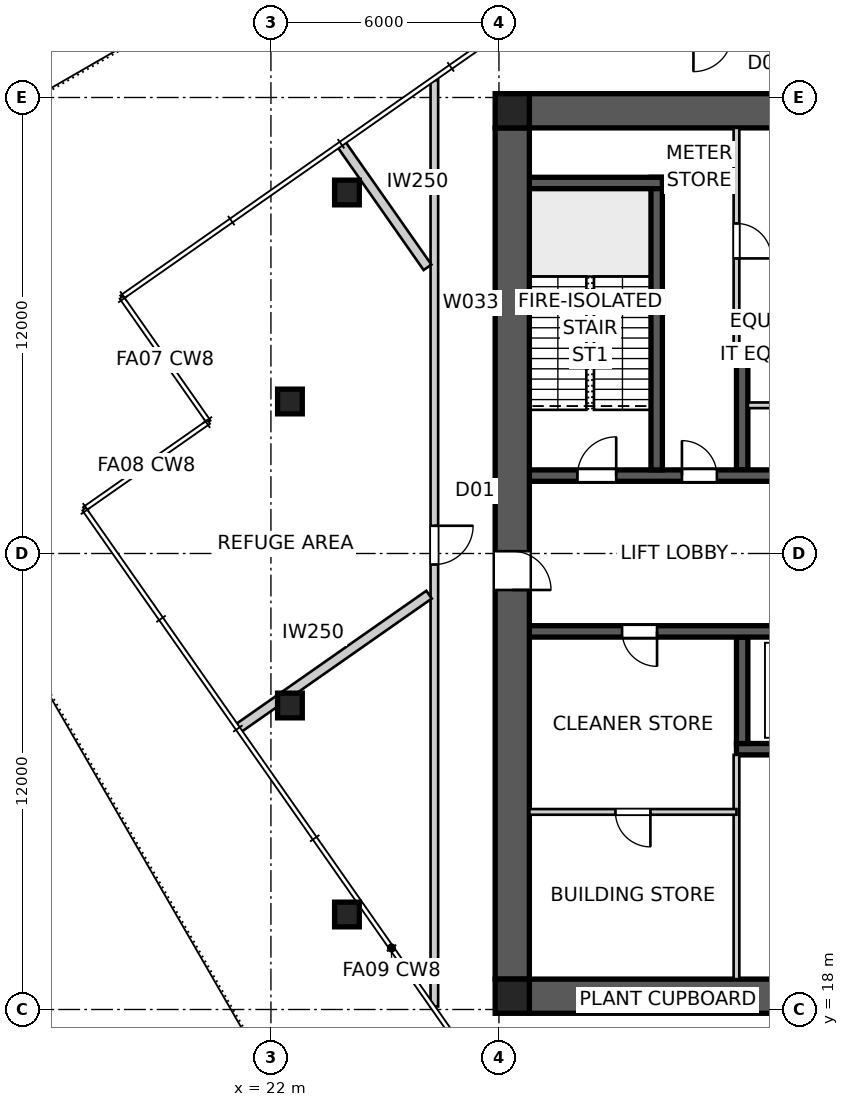
"""IFC4 building model, lengths in metres.
Left out: names, types, materials, properties, quantities, classifications, styles, units other than length and angle.
Written with IfcOpenShell. Run it as: python <this file> out.ifc"""

import sys

from ifc_helpers import new_model, si_unit, direction, frame, frame_2d, origin, origin_2d, place, context, subcontext, project, spatial, polyline, rectangle, outline, extrude, element, fill, save


model = new_model("IFC4")
c1 = context("Model", 3, precision=1e-05, world=origin(), true_north=direction((0.0, 1.0)))
c2 = subcontext(c1, "Body", "Model", "MODEL_VIEW")
j1 = project(units=[si_unit("LENGTHUNIT", "METRE"), si_unit("PLANEANGLEUNIT", "RADIAN")], contexts=[c1])
p1 = place(None, origin())
s1 = spatial("IfcSite", under=j1, at=p1, CompositionType="ELEMENT")
p2 = place(p1, origin())
s2 = spatial("IfcBuilding", under=s1, at=p2, CompositionType="ELEMENT")
p3 = place(p2, frame((0.0, 0.0, 235.4)))
s3 = spatial("IfcBuildingStorey", under=s2, at=p3, CompositionType="ELEMENT", Elevation=235.4)
for number, where, z_axis, x_axis in (
    (1, (28.8, 41.65, 0.0), (0.0, 0.0, 1.0), (1.0, 0.0, 0.0)),
    (2, (51.2, 18.35, 0.0), (0.0, 0.0, 1.0), (-1.0, 0.0, 0.0)),
):
    element("IfcWall", number, at=place(p3, frame(where, z_axis=z_axis, x_axis=x_axis)), inside=s3, PredefinedType="SHEAR", context=c2, shape_type="SweptSolid", body=[
        extrude(outline(polyline([(0.0, -0.45), (22.4, -0.45), (22.4, -0.025), (22.85, -0.025), (22.85, 0.025), (22.4, 0.025), (22.4, 0.45), (0.0, 0.45), (0.0, 0.025), (-0.45, 0.025), (-0.45, -0.025), (0.0, -0.025), (0.0, -0.45)])), origin(), (0.0, 0.0, 1.0), 5.0),
    ])
p4 = place(p3, frame((28.35, 41.2, 0.0), z_axis=(0.0, 0.0, 1.0), x_axis=(0.0, -1.0, 0.0)))
e3 = element("IfcWall", 3, at=p4, inside=s3, PredefinedType="SHEAR", context=c2, shape_type="SweptSolid", body=[
    extrude(outline(polyline([(0.0, -0.45), (22.4, -0.45), (22.4, -0.025), (22.85, -0.025), (22.85, 0.025), (22.4, 0.025), (22.4, 0.45), (0.0, 0.45), (0.0, 0.025), (-0.45, 0.025), (-0.45, -0.025), (0.0, -0.025), (0.0, -0.45)])), origin(), (0.0, 0.0, 1.0), 5.0),
])
p5 = place(p4, frame((11.14, 0.0, 0.0)))
e4 = element("IfcOpeningElement", 4, at=p5, cuts=e3, PredefinedType="OPENING", context=c2, shape_type="SweptSolid", body=[
    extrude(rectangle(XDim=1.02, YDim=2.4, at=frame_2d((0.51, 1.2))), frame((0.0, 0.46, 0.0), z_axis=(0.0, -1.0, 0.0), x_axis=(1.0, 0.0, 0.0)), (0.0, 0.0, 1.0), 0.92),
])
p6 = place(p3, frame((28.8, 32.05, 0.0), z_axis=(0.0, 0.0, 1.0), x_axis=(1.0, 0.0, 0.0)))
e5 = element("IfcWall", 5, at=p6, inside=s3, PredefinedType="SHEAR", context=c2, shape_type="SweptSolid", body=[
    extrude(rectangle(XDim=22.4, YDim=0.3, at=frame_2d((11.2, 0.0))), origin(), (0.0, 0.0, 1.0), 5.0),
])
p7 = place(p6, frame((19.04, 0.0, 0.0)))
e6 = element("IfcOpeningElement", 6, at=p7, cuts=e5, PredefinedType="OPENING", context=c2, shape_type="SweptSolid", body=[
    extrude(rectangle(XDim=0.92, YDim=2.1, at=frame_2d((0.46, 1.05))), frame((0.0, 0.16, 0.0), z_axis=(0.0, -1.0, 0.0), x_axis=(1.0, 0.0, 0.0)), (0.0, 0.0, 1.0), 0.32),
])
p8 = place(p6, frame((1.265, 0.0, 0.0)))
e7 = element("IfcOpeningElement", 7, at=p8, cuts=e5, PredefinedType="OPENING", context=c2, shape_type="SweptSolid", body=[
    extrude(rectangle(XDim=1.02, YDim=2.1, at=frame_2d((0.51, 1.05))), frame((0.0, 0.16, 0.0), z_axis=(0.0, -1.0, 0.0), x_axis=(1.0, 0.0, 0.0)), (0.0, 0.0, 1.0), 0.32),
])
p9 = place(p6, frame((4.015, 0.0, 0.0)))
e8 = element("IfcOpeningElement", 8, at=p9, cuts=e5, PredefinedType="OPENING", context=c2, shape_type="SweptSolid", body=[
    extrude(rectangle(XDim=0.92, YDim=2.1, at=frame_2d((0.46, 1.05))), frame((0.0, 0.16, 0.0), z_axis=(0.0, -1.0, 0.0), x_axis=(1.0, 0.0, 0.0)), (0.0, 0.0, 1.0), 0.32),
])
p10 = place(p6, frame((7.015, 0.0, 0.0)))
e9 = element("IfcOpeningElement", 9, at=p10, cuts=e5, PredefinedType="OPENING", context=c2, shape_type="SweptSolid", body=[
    extrude(rectangle(XDim=0.92, YDim=2.1, at=frame_2d((0.46, 1.05))), frame((0.0, 0.16, 0.0), z_axis=(0.0, -1.0, 0.0), x_axis=(1.0, 0.0, 0.0)), (0.0, 0.0, 1.0), 0.32),
])
p11 = place(p6, frame((9.34, 0.0, 0.0)))
e10 = element("IfcOpeningElement", 10, at=p11, cuts=e5, PredefinedType="OPENING", context=c2, shape_type="SweptSolid", body=[
    extrude(rectangle(XDim=0.92, YDim=2.1, at=frame_2d((0.46, 1.05))), frame((0.0, 0.16, 0.0), z_axis=(0.0, -1.0, 0.0), x_axis=(1.0, 0.0, 0.0)), (0.0, 0.0, 1.0), 0.32),
])
p12 = place(p6, frame((12.05, 0.0, 0.0)))
e11 = element("IfcOpeningElement", 11, at=p12, cuts=e5, PredefinedType="OPENING", context=c2, shape_type="SweptSolid", body=[
    extrude(rectangle(XDim=1.1, YDim=2.1, at=frame_2d((0.55, 1.05))), frame((0.0, 0.16, 0.0), z_axis=(0.0, -1.0, 0.0), x_axis=(1.0, 0.0, 0.0)), (0.0, 0.0, 1.0), 0.32),
])
p13 = place(p6, frame((14.85, 0.0, 0.0)))
e12 = element("IfcOpeningElement", 12, at=p13, cuts=e5, PredefinedType="OPENING", context=c2, shape_type="SweptSolid", body=[
    extrude(rectangle(XDim=1.1, YDim=2.1, at=frame_2d((0.55, 1.05))), frame((0.0, 0.16, 0.0), z_axis=(0.0, -1.0, 0.0), x_axis=(1.0, 0.0, 0.0)), (0.0, 0.0, 1.0), 0.32),
])
p14 = place(p3, frame((51.2, 27.95, 0.0), z_axis=(0.0, 0.0, 1.0), x_axis=(-1.0, 0.0, 0.0)))
e13 = element("IfcWall", 13, at=p14, inside=s3, PredefinedType="SHEAR", context=c2, shape_type="SweptSolid", body=[
    extrude(rectangle(XDim=22.4, YDim=0.3, at=frame_2d((11.2, 0.0))), origin(), (0.0, 0.0, 1.0), 5.0),
])
p15 = place(p14, frame((19.04, 0.0, 0.0)))
e14 = element("IfcOpeningElement", 14, at=p15, cuts=e13, PredefinedType="OPENING", context=c2, shape_type="SweptSolid", body=[
    extrude(rectangle(XDim=0.92, YDim=2.1, at=frame_2d((0.46, 1.05))), frame((0.0, 0.16, 0.0), z_axis=(0.0, -1.0, 0.0), x_axis=(1.0, 0.0, 0.0)), (0.0, 0.0, 1.0), 0.32),
])
p16 = place(p14, frame((1.265, 0.0, 0.0)))
e15 = element("IfcOpeningElement", 15, at=p16, cuts=e13, PredefinedType="OPENING", context=c2, shape_type="SweptSolid", body=[
    extrude(rectangle(XDim=1.02, YDim=2.1, at=frame_2d((0.51, 1.05))), frame((0.0, 0.16, 0.0), z_axis=(0.0, -1.0, 0.0), x_axis=(1.0, 0.0, 0.0)), (0.0, 0.0, 1.0), 0.32),
])
p17 = place(p14, frame((4.015, 0.0, 0.0)))
e16 = element("IfcOpeningElement", 16, at=p17, cuts=e13, PredefinedType="OPENING", context=c2, shape_type="SweptSolid", body=[
    extrude(rectangle(XDim=0.92, YDim=2.1, at=frame_2d((0.46, 1.05))), frame((0.0, 0.16, 0.0), z_axis=(0.0, -1.0, 0.0), x_axis=(1.0, 0.0, 0.0)), (0.0, 0.0, 1.0), 0.32),
])
p18 = place(p14, frame((9.79, 0.0, 0.0)))
e17 = element("IfcOpeningElement", 17, at=p18, cuts=e13, PredefinedType="OPENING", context=c2, shape_type="SweptSolid", body=[
    extrude(rectangle(XDim=0.92, YDim=2.1, at=frame_2d((0.46, 1.05))), frame((0.0, 0.16, 0.0), z_axis=(0.0, -1.0, 0.0), x_axis=(1.0, 0.0, 0.0)), (0.0, 0.0, 1.0), 0.32),
])
p19 = place(p14, frame((6.115, 0.0, 0.0)))
e18 = element("IfcOpeningElement", 18, at=p19, cuts=e13, PredefinedType="OPENING", context=c2, shape_type="SweptSolid", body=[
    extrude(rectangle(XDim=0.92, YDim=2.1, at=frame_2d((0.46, 1.05))), frame((0.0, 0.16, 0.0), z_axis=(0.0, -1.0, 0.0), x_axis=(1.0, 0.0, 0.0)), (0.0, 0.0, 1.0), 0.32),
])
p20 = place(p14, frame((12.05, 0.0, 0.0)))
e19 = element("IfcOpeningElement", 19, at=p20, cuts=e13, PredefinedType="OPENING", context=c2, shape_type="SweptSolid", body=[
    extrude(rectangle(XDim=1.1, YDim=2.1, at=frame_2d((0.55, 1.05))), frame((0.0, 0.16, 0.0), z_axis=(0.0, -1.0, 0.0), x_axis=(1.0, 0.0, 0.0)), (0.0, 0.0, 1.0), 0.32),
])
p21 = place(p14, frame((14.85, 0.0, 0.0)))
e20 = element("IfcOpeningElement", 20, at=p21, cuts=e13, PredefinedType="OPENING", context=c2, shape_type="SweptSolid", body=[
    extrude(rectangle(XDim=1.1, YDim=2.1, at=frame_2d((0.55, 1.05))), frame((0.0, 0.16, 0.0), z_axis=(0.0, -1.0, 0.0), x_axis=(1.0, 0.0, 0.0)), (0.0, 0.0, 1.0), 0.32),
])
for number, where, z_axis, x_axis in (
    (21, (34.25, 35.15, 0.0), (0.0, 0.0, 1.0), (1.0, 0.0, 0.0)),
    (22, (45.75, 24.85, 0.0), (0.0, 0.0, 1.0), (-1.0, 0.0, 0.0)),
):
    element("IfcWall", number, at=place(p3, frame(where, z_axis=z_axis, x_axis=x_axis)), inside=s3, PredefinedType="SHEAR", context=c2, shape_type="SweptSolid", body=[
        extrude(rectangle(XDim=11.5, YDim=0.3, at=frame_2d((5.75, 0.0))), origin(), (0.0, 0.0, 1.0), 5.0),
    ])
for number, where, z_axis, x_axis in (
    (23, (34.4, 32.2, 0.0), (0.0, 0.0, 1.0), (0.0, 1.0, 0.0)),
    (24, (34.4, 27.8, 0.0), (0.0, 0.0, 1.0), (0.0, -1.0, 0.0)),
):
    element("IfcWall", number, at=place(p3, frame(where, z_axis=z_axis, x_axis=x_axis)), inside=s3, PredefinedType="SHEAR", context=c2, shape_type="SweptSolid", body=[
        extrude(rectangle(XDim=2.8, YDim=0.3, at=frame_2d((1.4, 0.0))), origin(), (0.0, 0.0, 1.0), 5.0),
    ])
p22 = place(p3, frame((32.15, 32.2, 0.0), z_axis=(0.0, 0.0, 1.0), x_axis=(0.0, 1.0, 0.0)))
e25 = element("IfcWall", 25, at=p22, inside=s3, PredefinedType="SHEAR", context=c2, shape_type="SweptSolid", body=[
    extrude(rectangle(XDim=7.7, YDim=0.3, at=frame_2d((3.85, 0.0))), origin(), (0.0, 0.0, 1.0), 5.0),
])
p23 = place(p3, frame((28.8, 39.75, 0.0), z_axis=(0.0, 0.0, 1.0), x_axis=(1.0, 0.0, 0.0)))
e26 = element("IfcWall", 26, at=p23, inside=s3, PredefinedType="SHEAR", context=c2, shape_type="SweptSolid", body=[
    extrude(rectangle(XDim=3.5, YDim=0.3, at=frame_2d((1.75, 0.0))), origin(), (0.0, 0.0, 1.0), 5.0),
])
for number, where, z_axis, x_axis in (
    (27, (28.35, 18.35, 0.0), (0.0, 0.0, 1.0), (1.0, 0.0, 0.0)),
    (28, (28.35, 41.65, 0.0), (0.0, 0.0, 1.0), (1.0, 0.0, 0.0)),
):
    element("IfcColumn", number, at=place(p3, frame(where, z_axis=z_axis, x_axis=x_axis)), inside=s3, PredefinedType="COLUMN", context=c2, shape_type="SweptSolid", body=[
        extrude(rectangle(XDim=0.9, YDim=0.9, at=origin_2d()), origin(), (0.0, 0.0, 1.0), 5.0),
    ])
for number, where, z_axis, x_axis in (
    (29, (24.0, 39.5, 0.0), (0.0, 0.0, 1.0), (1.0, 0.0, 0.0)),
    (30, (22.5, 34.0, 0.0), (0.0, 0.0, 1.0), (1.0, 0.0, 0.0)),
    (31, (22.5, 26.0, 0.0), (0.0, 0.0, 1.0), (1.0, 0.0, 0.0)),
    (32, (24.0, 20.5, 0.0), (0.0, 0.0, 1.0), (1.0, 0.0, 0.0)),
):
    element("IfcColumn", number, at=place(p3, frame(where, z_axis=z_axis, x_axis=x_axis)), inside=s3, PredefinedType="COLUMN", context=c2, shape_type="SweptSolid", body=[
        extrude(rectangle(XDim=0.65, YDim=0.65, at=origin_2d()), origin(), (0.0, 0.0, 1.0), 5.0),
    ])
p24 = place(p3, frame((26.3, 42.454, 0.0), z_axis=(0.0, 0.0, 1.0), x_axis=(0.0, -1.0, 0.0)))
e33 = element("IfcWall", 33, at=p24, inside=s3, PredefinedType="PARTITIONING", context=c2, shape_type="SweptSolid", body=[
    extrude(rectangle(XDim=24.375, YDim=0.2, at=frame_2d((12.188, 0.0))), origin(), (0.0, 0.0, 1.0), 4.85),
])
p25 = place(p24, frame((11.725, 0.0, 0.0)))
e34 = element("IfcOpeningElement", 34, at=p25, cuts=e33, PredefinedType="OPENING", context=c2, shape_type="SweptSolid", body=[
    extrude(rectangle(XDim=1.02, YDim=2.34, at=frame_2d((0.51, 1.17))), frame((0.0, 0.11, 0.0), z_axis=(0.0, -1.0, 0.0), x_axis=(1.0, 0.0, 0.0)), (0.0, 0.0, 1.0), 0.22),
])
p26 = place(p3, frame((23.843, 40.783, 0.0), z_axis=(0.0, 0.0, 1.0), x_axis=(0.573569635732, -0.819156806092, 0.0)))
e35 = element("IfcWall", 35, at=p26, inside=s3, PredefinedType="PARTITIONING", context=c2, shape_type="SweptSolid", body=[
    extrude(rectangle(XDim=3.97, YDim=0.25, at=frame_2d((1.985, 0.0))), origin(), (0.0, 0.0, 1.0), 4.85),
])
p27 = place(p3, frame((21.13, 25.393, 0.0), z_axis=(0.0, 0.0, 1.0), x_axis=(0.819162822725, 0.573561042841, 0.0)))
e36 = element("IfcWall", 36, at=p27, inside=s3, PredefinedType="PARTITIONING", context=c2, shape_type="SweptSolid", body=[
    extrude(rectangle(XDim=6.142, YDim=0.25, at=frame_2d((3.071, 0.0))), origin(), (0.0, 0.0, 1.0), 4.85),
])
p28 = place(p3, frame((34.25, 41.2, 0.0), z_axis=(0.0, 0.0, 1.0), x_axis=(0.0, -1.0, 0.0)))
e37 = element("IfcWall", 37, at=p28, inside=s3, PredefinedType="SOLIDWALL", context=c2, shape_type="SweptSolid", body=[
    extrude(rectangle(XDim=5.95, YDim=0.15, at=frame_2d((2.975, 0.0))), origin(), (0.0, 0.0, 1.0), 4.85),
])
p29 = place(p28, frame((2.515, 0.0, 0.0)))
e38 = element("IfcOpeningElement", 38, at=p29, cuts=e37, PredefinedType="OPENING", context=c2, shape_type="SweptSolid", body=[
    extrude(rectangle(XDim=0.92, YDim=2.1, at=frame_2d((0.46, 1.05))), frame((0.0, 0.085, 0.0), z_axis=(0.0, -1.0, 0.0), x_axis=(1.0, 0.0, 0.0)), (0.0, 0.0, 1.0), 0.17),
])
p30 = place(p3, frame((34.25, 18.8, 0.0), z_axis=(0.0, 0.0, 1.0), x_axis=(0.0, 1.0, 0.0)))
e39 = element("IfcWall", 39, at=p30, inside=s3, PredefinedType="SOLIDWALL", context=c2, shape_type="SweptSolid", body=[
    extrude(rectangle(XDim=5.9, YDim=0.15, at=frame_2d((2.95, 0.0))), origin(), (0.0, 0.0, 1.0), 4.85),
])
p31 = place(p3, frame((34.25, 23.2, 0.0), z_axis=(0.0, 0.0, 1.0), x_axis=(-1.0, 0.0, 0.0)))
e40 = element("IfcWall", 40, at=p31, inside=s3, PredefinedType="SOLIDWALL", context=c2, shape_type="SweptSolid", body=[
    extrude(rectangle(XDim=5.45, YDim=0.15, at=frame_2d((2.725, 0.0))), origin(), (0.0, 0.0, 1.0), 4.85),
])
p32 = place(p31, frame((2.265, 0.0, 0.0)))
e41 = element("IfcOpeningElement", 41, at=p32, cuts=e40, PredefinedType="OPENING", context=c2, shape_type="SweptSolid", body=[
    extrude(rectangle(XDim=0.92, YDim=2.1, at=frame_2d((0.46, 1.05))), frame((0.0, 0.085, 0.0), z_axis=(0.0, -1.0, 0.0), x_axis=(1.0, 0.0, 0.0)), (0.0, 0.0, 1.0), 0.17),
])
p33 = place(p3, frame((34.55, 33.9, 0.0), z_axis=(0.0, 0.0, 1.0), x_axis=(1.0, 0.0, 0.0)))
e42 = element("IfcWall", 42, at=p33, inside=s3, PredefinedType="SOLIDWALL", context=c2, shape_type="SweptSolid", body=[
    extrude(rectangle(XDim=5.35, YDim=0.15, at=frame_2d((2.675, 0.0))), origin(), (0.0, 0.0, 1.0), 4.85),
])
p34 = place(p33, frame((2.215, 0.0, 0.0)))
e43 = element("IfcOpeningElement", 43, at=p34, cuts=e42, PredefinedType="OPENING", context=c2, shape_type="SweptSolid", body=[
    extrude(rectangle(XDim=0.92, YDim=2.1, at=frame_2d((0.46, 1.05))), frame((0.0, 0.085, 0.0), z_axis=(0.0, -1.0, 0.0), x_axis=(1.0, 0.0, 0.0)), (0.0, 0.0, 1.0), 0.17),
])
p35 = place(p15, origin())
e44 = element("IfcDoor", 44, at=p35, inside=s3, OperationType="SINGLE_SWING_LEFT", PredefinedType="DOOR", context=c2, shape_type="SweptSolid", body=[
    extrude(rectangle(XDim=0.92, YDim=2.1, at=frame_2d((0.46, 1.05))), frame((0.0, 0.025, 0.0), z_axis=(0.0, -1.0, 0.0), x_axis=(1.0, 0.0, 0.0)), (0.0, 0.0, 1.0), 0.05),
])
fill(e14, e44)
p36 = place(p8, origin())
e45 = element("IfcDoor", 45, at=p36, inside=s3, OperationType="SINGLE_SWING_RIGHT", PredefinedType="DOOR", context=c2, shape_type="SweptSolid", body=[
    extrude(rectangle(XDim=1.02, YDim=2.1, at=frame_2d((0.51, 1.05))), frame((0.0, 0.025, 0.0), z_axis=(0.0, -1.0, 0.0), x_axis=(1.0, 0.0, 0.0)), (0.0, 0.0, 1.0), 0.05),
])
fill(e7, e45)
p37 = place(p9, origin())
e46 = element("IfcDoor", 46, at=p37, inside=s3, OperationType="SINGLE_SWING_LEFT", PredefinedType="DOOR", context=c2, shape_type="SweptSolid", body=[
    extrude(rectangle(XDim=0.92, YDim=2.1, at=frame_2d((0.46, 1.05))), frame((0.0, 0.025, 0.0), z_axis=(0.0, -1.0, 0.0), x_axis=(1.0, 0.0, 0.0)), (0.0, 0.0, 1.0), 0.05),
])
fill(e8, e46)
p38 = place(p25, origin())
e47 = element("IfcDoor", 47, at=p38, inside=s3, OperationType="SINGLE_SWING_LEFT", PredefinedType="DOOR", context=c2, shape_type="SweptSolid", body=[
    extrude(rectangle(XDim=1.02, YDim=2.34, at=frame_2d((0.51, 1.17))), frame((0.0, 0.025, 0.0), z_axis=(0.0, -1.0, 0.0), x_axis=(1.0, 0.0, 0.0)), (0.0, 0.0, 1.0), 0.05),
])
fill(e34, e47)
p39 = place(p32, origin())
e48 = element("IfcDoor", 48, at=p39, inside=s3, OperationType="SINGLE_SWING_LEFT", PredefinedType="DOOR", context=c2, shape_type="SweptSolid", body=[
    extrude(rectangle(XDim=0.92, YDim=2.1, at=frame_2d((0.46, 1.05))), frame((0.0, 0.025, 0.0), z_axis=(0.0, -1.0, 0.0), x_axis=(1.0, 0.0, 0.0)), (0.0, 0.0, 1.0), 0.05),
])
fill(e41, e48)
p40 = place(p29, origin())
e49 = element("IfcDoor", 49, at=p40, inside=s3, OperationType="SINGLE_SWING_RIGHT", PredefinedType="DOOR", context=c2, shape_type="SweptSolid", body=[
    extrude(rectangle(XDim=0.92, YDim=2.1, at=frame_2d((0.46, 1.05))), frame((0.0, 0.025, 0.0), z_axis=(0.0, -1.0, 0.0), x_axis=(1.0, 0.0, 0.0)), (0.0, 0.0, 1.0), 0.05),
])
fill(e38, e49)
p41 = place(p5, origin())
e50 = element("IfcDoor", 50, at=p41, inside=s3, OperationType="SINGLE_SWING_RIGHT", PredefinedType="DOOR", context=c2, shape_type="SweptSolid", body=[
    extrude(rectangle(XDim=1.02, YDim=2.4, at=frame_2d((0.51, 1.2))), frame((0.0, 0.025, 0.0), z_axis=(0.0, -1.0, 0.0), x_axis=(1.0, 0.0, 0.0)), (0.0, 0.0, 1.0), 0.05),
])
fill(e4, e50)
save(model, sys.argv[1])
